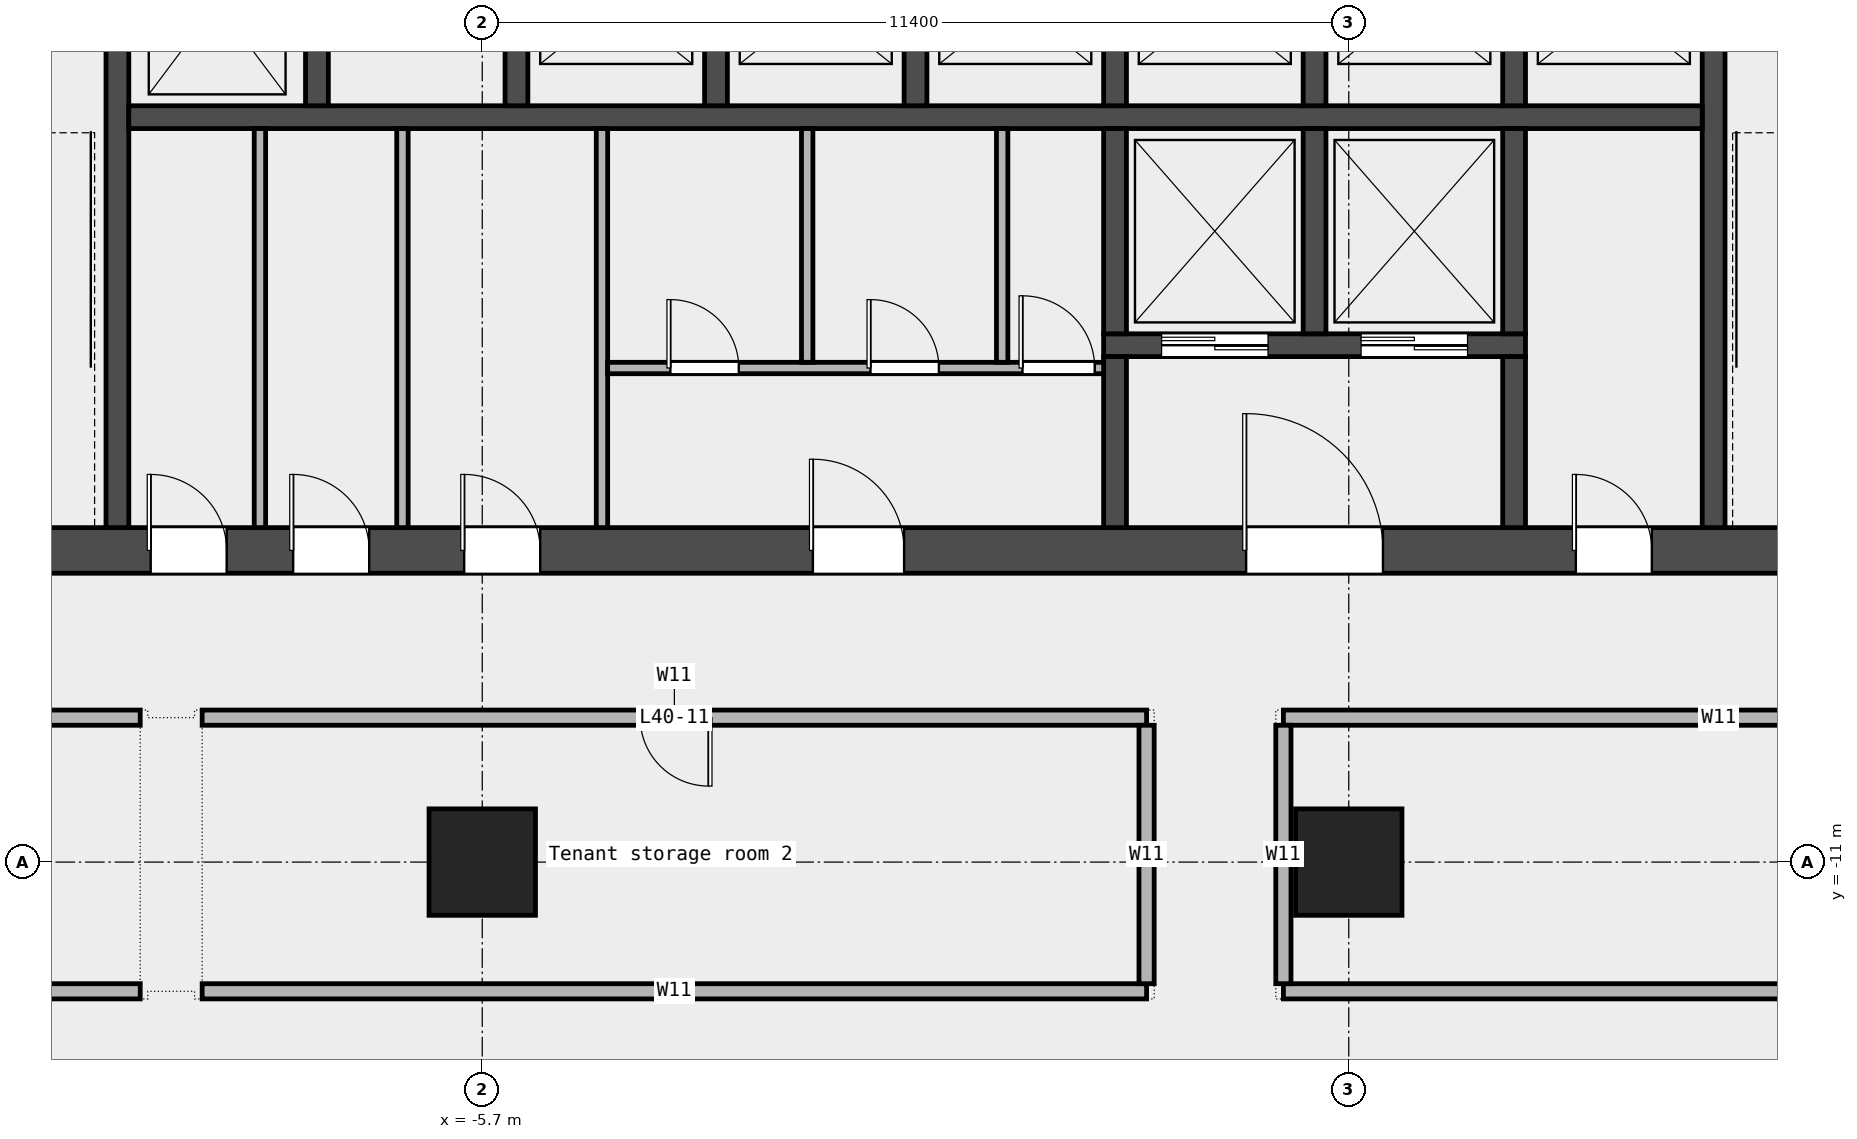
"""IFC4 building model, lengths in metres.
Left out: names, types, materials, properties, quantities, classifications, styles, units other than length and angle.
Written with IfcOpenShell. Run it as: python <this file> out.ifc"""

import sys

from ifc_helpers import new_model, si_unit, direction, frame, frame_2d, origin, origin_2d, place, context, subcontext, project, spatial, rectangle, extrude, element, fill, save


model = new_model("IFC4")
c1 = context("Model", 3, precision=1e-05, world=origin(), true_north=direction((0.0, 1.0)))
c2 = subcontext(c1, "Body", "Model", "MODEL_VIEW")
j1 = project(units=[si_unit("LENGTHUNIT", "METRE"), si_unit("PLANEANGLEUNIT", "RADIAN")], contexts=[c1])
p1 = place(None, origin())
s1 = spatial("IfcSite", under=j1, at=p1, CompositionType="ELEMENT")
p2 = place(p1, origin())
s2 = spatial("IfcBuilding", under=s1, at=p2, CompositionType="ELEMENT")
p3 = place(p2, frame((0.0, 0.0, 193.0)))
s3 = spatial("IfcBuildingStorey", under=s2, at=p3, CompositionType="ELEMENT", Elevation=193.0)
for number, where, z_axis, x_axis in (
    (1, (-5.7, -11.0, 0.0), (0.0, 0.0, 1.0), (1.0, 0.0, 0.0)),
    (2, (5.7, -11.0, 0.0), (0.0, 0.0, 1.0), (1.0, 0.0, 0.0)),
):
    element("IfcColumn", number, at=place(p3, frame(where, z_axis=z_axis, x_axis=x_axis)), inside=s3, PredefinedType="COLUMN", context=c2, shape_type="SweptSolid", body=[
        extrude(rectangle(XDim=1.4, YDim=1.4, at=origin_2d()), origin(), (0.0, 0.0, 1.0), 3.6),
    ])
p4 = place(p3, frame((-24.15, -12.7, 0.0), z_axis=(0.0, 0.0, 1.0), x_axis=(1.0, 0.0, 0.0)))
e3 = element("IfcWall", 3, at=p4, inside=s3, PredefinedType="PARTITIONING", context=c2, shape_type="SweptSolid", body=[
    extrude(rectangle(XDim=13.95, YDim=0.2, at=frame_2d((6.975, 0.0))), origin(), (0.0, 0.0, 1.0), 3.6),
])
p5 = place(p4, frame((7.825, 0.0, 0.0)))
e4 = element("IfcOpeningElement", 4, at=p5, cuts=e3, PredefinedType="OPENING", context=c2, shape_type="SweptSolid", body=[
    extrude(rectangle(XDim=1.5, YDim=2.1, at=frame_2d((0.75, 1.05))), frame((0.0, 0.112, 0.0), z_axis=(0.0, -1.0, 0.0), x_axis=(1.0, 0.0, 0.0)), (0.0, 0.0, 1.0), 0.224),
])
p6 = place(p3, frame((-9.385, -12.7, 0.0), z_axis=(0.0, 0.0, 1.0), x_axis=(1.0, 0.0, 0.0)))
e5 = element("IfcWall", 5, at=p6, inside=s3, PredefinedType="PARTITIONING", context=c2, shape_type="SweptSolid", body=[
    extrude(rectangle(XDim=12.425, YDim=0.2, at=frame_2d((6.212, 0.0))), origin(), (0.0, 0.0, 1.0), 3.6),
])
p7 = place(p3, frame((4.84, -12.7, 0.0), z_axis=(0.0, 0.0, 1.0), x_axis=(1.0, 0.0, 0.0)))
e6 = element("IfcWall", 6, at=p7, inside=s3, PredefinedType="PARTITIONING", context=c2, shape_type="SweptSolid", body=[
    extrude(rectangle(XDim=21.31, YDim=0.2, at=frame_2d((10.655, 0.0))), origin(), (0.0, 0.0, 1.0), 3.6),
])
p8 = place(p7, frame((9.955, 0.0, 0.0)))
e7 = element("IfcOpeningElement", 7, at=p8, cuts=e6, PredefinedType="OPENING", context=c2, shape_type="SweptSolid", body=[
    extrude(rectangle(XDim=1.2, YDim=2.1, at=frame_2d((0.6, 1.05))), frame((0.0, 0.112, 0.0), z_axis=(0.0, -1.0, 0.0), x_axis=(1.0, 0.0, 0.0)), (0.0, 0.0, 1.0), 0.224),
])
p9 = place(p3, frame((-16.3, -9.1, 0.0), z_axis=(0.0, 0.0, 1.0), x_axis=(1.0, 0.0, 0.0)))
e8 = element("IfcWall", 8, at=p9, inside=s3, PredefinedType="PARTITIONING", context=c2, shape_type="SweptSolid", body=[
    extrude(rectangle(XDim=6.1, YDim=0.2, at=frame_2d((3.05, 0.0))), origin(), (0.0, 0.0, 1.0), 3.6),
])
p10 = place(p3, frame((-9.385, -9.1, 0.0), z_axis=(0.0, 0.0, 1.0), x_axis=(1.0, 0.0, 0.0)))
e9 = element("IfcWall", 9, at=p10, inside=s3, PredefinedType="PARTITIONING", context=c2, shape_type="SweptSolid", body=[
    extrude(rectangle(XDim=12.425, YDim=0.2, at=frame_2d((6.212, 0.0))), origin(), (0.0, 0.0, 1.0), 3.6),
])
p11 = place(p10, frame((5.762, 0.0, 0.0)))
e10 = element("IfcOpeningElement", 10, at=p11, cuts=e9, PredefinedType="OPENING", context=c2, shape_type="SweptSolid", body=[
    extrude(rectangle(XDim=0.9, YDim=2.1, at=frame_2d((0.45, 1.05))), frame((0.0, 0.112, 0.0), z_axis=(0.0, -1.0, 0.0), x_axis=(1.0, 0.0, 0.0)), (0.0, 0.0, 1.0), 0.224),
])
p12 = place(p3, frame((4.84, -9.1, 0.0), z_axis=(0.0, 0.0, 1.0), x_axis=(1.0, 0.0, 0.0)))
e11 = element("IfcWall", 11, at=p12, inside=s3, PredefinedType="PARTITIONING", context=c2, shape_type="SweptSolid", body=[
    extrude(rectangle(XDim=11.46, YDim=0.2, at=frame_2d((5.73, 0.0))), origin(), (0.0, 0.0, 1.0), 3.6),
])
for number, where, z_axis, x_axis in (
    (12, (3.04, -12.6, 0.0), (0.0, 0.0, 1.0), (0.0, 1.0, 0.0)),
    (13, (4.84, -12.6, 0.0), (0.0, 0.0, 1.0), (0.0, 1.0, 0.0)),
):
    element("IfcWall", number, at=place(p3, frame(where, z_axis=z_axis, x_axis=x_axis)), inside=s3, PredefinedType="PARTITIONING", context=c2, shape_type="SweptSolid", body=[
        extrude(rectangle(XDim=3.4, YDim=0.2, at=frame_2d((1.7, 0.0))), origin(), (0.0, 0.0, 1.0), 3.6),
    ])
p13 = place(p3, frame((-14.4, -6.9, 0.0), z_axis=(0.0, 0.0, 1.0), x_axis=(1.0, 0.0, 0.0)))
e14 = element("IfcWall", 14, at=p13, inside=s3, PredefinedType="SHEAR", context=c2, shape_type="SweptSolid", body=[
    extrude(rectangle(XDim=28.8, YDim=0.6, at=frame_2d((14.4, 0.0))), origin(), (0.0, 0.0, 1.0), 3.7),
])
p14 = place(p13, frame((4.337, 0.0, 0.0)))
e15 = element("IfcOpeningElement", 15, at=p14, cuts=e14, PredefinedType="OPENING", context=c2, shape_type="SweptSolid", body=[
    extrude(rectangle(XDim=1.0, YDim=2.1, at=frame_2d((0.5, 1.05))), frame((0.0, 0.312, 0.0), z_axis=(0.0, -1.0, 0.0), x_axis=(1.0, 0.0, 0.0)), (0.0, 0.0, 1.0), 0.624),
])
p15 = place(p13, frame((6.212, 0.0, 0.0)))
e16 = element("IfcOpeningElement", 16, at=p15, cuts=e14, PredefinedType="OPENING", context=c2, shape_type="SweptSolid", body=[
    extrude(rectangle(XDim=1.0, YDim=2.1, at=frame_2d((0.5, 1.05))), frame((0.0, 0.312, 0.0), z_axis=(0.0, -1.0, 0.0), x_axis=(1.0, 0.0, 0.0)), (0.0, 0.0, 1.0), 0.624),
])
p16 = place(p13, frame((8.462, 0.0, 0.0)))
e17 = element("IfcOpeningElement", 17, at=p16, cuts=e14, PredefinedType="OPENING", context=c2, shape_type="SweptSolid", body=[
    extrude(rectangle(XDim=1.0, YDim=2.1, at=frame_2d((0.5, 1.05))), frame((0.0, 0.312, 0.0), z_axis=(0.0, -1.0, 0.0), x_axis=(1.0, 0.0, 0.0)), (0.0, 0.0, 1.0), 0.624),
])
p17 = place(p13, frame((13.05, 0.0, 0.0)))
e18 = element("IfcOpeningElement", 18, at=p17, cuts=e14, PredefinedType="OPENING", context=c2, shape_type="SweptSolid", body=[
    extrude(rectangle(XDim=1.2, YDim=2.1, at=frame_2d((0.6, 1.05))), frame((0.0, 0.312, 0.0), z_axis=(0.0, -1.0, 0.0), x_axis=(1.0, 0.0, 0.0)), (0.0, 0.0, 1.0), 0.624),
])
p18 = place(p13, frame((18.75, 0.0, 0.0)))
e19 = element("IfcOpeningElement", 19, at=p18, cuts=e14, PredefinedType="OPENING", context=c2, shape_type="SweptSolid", body=[
    extrude(rectangle(XDim=1.8, YDim=2.1, at=frame_2d((0.9, 1.05))), frame((0.0, 0.312, 0.0), z_axis=(0.0, -1.0, 0.0), x_axis=(1.0, 0.0, 0.0)), (0.0, 0.0, 1.0), 0.624),
])
p19 = place(p13, frame((23.087, 0.0, 0.0)))
e20 = element("IfcOpeningElement", 20, at=p19, cuts=e14, PredefinedType="OPENING", context=c2, shape_type="SweptSolid", body=[
    extrude(rectangle(XDim=1.0, YDim=2.1, at=frame_2d((0.5, 1.05))), frame((0.0, 0.312, 0.0), z_axis=(0.0, -1.0, 0.0), x_axis=(1.0, 0.0, 0.0)), (0.0, 0.0, 1.0), 0.624),
])
for number, where, z_axis, x_axis in (
    (21, (-10.5, -6.6, 0.0), (0.0, 0.0, 1.0), (0.0, 1.0, 0.0)),
    (22, (10.5, -6.6, 0.0), (0.0, 0.0, 1.0), (0.0, 1.0, 0.0)),
):
    element("IfcWall", number, at=place(p3, frame(where, z_axis=z_axis, x_axis=x_axis)), inside=s3, PredefinedType="SHEAR", context=c2, shape_type="SweptSolid", body=[
        extrude(rectangle(XDim=8.55, YDim=0.3, at=frame_2d((4.275, 0.0))), origin(), (0.0, 0.0, 1.0), 3.7),
    ])
p20 = place(p3, frame((-10.35, -1.2, 0.0), z_axis=(0.0, 0.0, 1.0), x_axis=(1.0, 0.0, 0.0)))
e23 = element("IfcWall", 23, at=p20, inside=s3, PredefinedType="SOLIDWALL", context=c2, shape_type="SweptSolid", body=[
    extrude(rectangle(XDim=20.7, YDim=0.3, at=frame_2d((10.35, 0.0))), origin(), (0.0, 0.0, 1.0), 3.7),
])
for number, where, z_axis, x_axis in (
    (24, (-7.875, -1.05, 0.0), (0.0, 0.0, 1.0), (0.0, 1.0, 0.0)),
    (25, (-5.25, -1.05, 0.0), (0.0, 0.0, 1.0), (0.0, 1.0, 0.0)),
    (26, (-2.625, -1.05, 0.0), (0.0, 0.0, 1.0), (0.0, 1.0, 0.0)),
    (27, (0.0, -1.05, 0.0), (0.0, 0.0, 1.0), (0.0, 1.0, 0.0)),
    (28, (2.625, -1.05, 0.0), (0.0, 0.0, 1.0), (0.0, 1.0, 0.0)),
    (29, (5.25, -1.05, 0.0), (0.0, 0.0, 1.0), (0.0, 1.0, 0.0)),
    (30, (7.875, -1.05, 0.0), (0.0, 0.0, 1.0), (0.0, 1.0, 0.0)),
):
    element("IfcWall", number, at=place(p3, frame(where, z_axis=z_axis, x_axis=x_axis)), inside=s3, PredefinedType="SOLIDWALL", context=c2, shape_type="SweptSolid", body=[
        extrude(rectangle(XDim=2.7, YDim=0.3, at=frame_2d((1.35, 0.0))), origin(), (0.0, 0.0, 1.0), 3.7),
    ])
p21 = place(p3, frame((2.475, -4.2, 0.0), z_axis=(0.0, 0.0, 1.0), x_axis=(1.0, 0.0, 0.0)))
e31 = element("IfcWall", 31, at=p21, inside=s3, PredefinedType="SOLIDWALL", context=c2, shape_type="SweptSolid", body=[
    extrude(rectangle(XDim=5.55, YDim=0.3, at=frame_2d((2.775, 0.0))), origin(), (0.0, 0.0, 1.0), 3.7),
])
p22 = place(p21, frame((0.762, 0.0, 0.0)))
e32 = element("IfcOpeningElement", 32, at=p22, cuts=e31, PredefinedType="OPENING", context=c2, shape_type="SweptSolid", body=[
    extrude(rectangle(XDim=1.4, YDim=2.1, at=frame_2d((0.7, 1.05))), frame((0.0, 0.162, 0.0), z_axis=(0.0, -1.0, 0.0), x_axis=(1.0, 0.0, 0.0)), (0.0, 0.0, 1.0), 0.324),
])
p23 = place(p21, frame((3.387, 0.0, 0.0)))
e33 = element("IfcOpeningElement", 33, at=p23, cuts=e31, PredefinedType="OPENING", context=c2, shape_type="SweptSolid", body=[
    extrude(rectangle(XDim=1.4, YDim=2.1, at=frame_2d((0.7, 1.05))), frame((0.0, 0.162, 0.0), z_axis=(0.0, -1.0, 0.0), x_axis=(1.0, 0.0, 0.0)), (0.0, 0.0, 1.0), 0.324),
])
p24 = place(p3, frame((2.625, -4.05, 0.0), z_axis=(0.0, 0.0, 1.0), x_axis=(0.0, 1.0, 0.0)))
e34 = element("IfcWall", 34, at=p24, inside=s3, PredefinedType="SOLIDWALL", context=c2, shape_type="SweptSolid", body=[
    extrude(rectangle(XDim=2.7, YDim=0.3, at=frame_2d((1.35, 0.0))), origin(), (0.0, 0.0, 1.0), 3.7),
])
p25 = place(p3, frame((2.625, -6.6, 0.0), z_axis=(0.0, 0.0, 1.0), x_axis=(0.0, 1.0, 0.0)))
e35 = element("IfcWall", 35, at=p25, inside=s3, PredefinedType="SOLIDWALL", context=c2, shape_type="SweptSolid", body=[
    extrude(rectangle(XDim=2.25, YDim=0.3, at=frame_2d((1.125, 0.0))), origin(), (0.0, 0.0, 1.0), 3.7),
])
for number, where, z_axis, x_axis in (
    (36, (5.25, -4.05, 0.0), (0.0, 0.0, 1.0), (0.0, 1.0, 0.0)),
    (37, (7.875, -4.05, 0.0), (0.0, 0.0, 1.0), (0.0, 1.0, 0.0)),
):
    element("IfcWall", number, at=place(p3, frame(where, z_axis=z_axis, x_axis=x_axis)), inside=s3, PredefinedType="SOLIDWALL", context=c2, shape_type="SweptSolid", body=[
        extrude(rectangle(XDim=2.7, YDim=0.3, at=frame_2d((1.35, 0.0))), origin(), (0.0, 0.0, 1.0), 3.7),
    ])
p26 = place(p3, frame((7.875, -6.6, 0.0), z_axis=(0.0, 0.0, 1.0), x_axis=(0.0, 1.0, 0.0)))
e38 = element("IfcWall", 38, at=p26, inside=s3, PredefinedType="SOLIDWALL", context=c2, shape_type="SweptSolid", body=[
    extrude(rectangle(XDim=2.25, YDim=0.3, at=frame_2d((1.125, 0.0))), origin(), (0.0, 0.0, 1.0), 3.7),
])
for number, where, z_axis, x_axis in (
    (39, (-8.625, -6.6, 0.0), (0.0, 0.0, 1.0), (0.0, 1.0, 0.0)),
    (40, (-6.75, -6.6, 0.0), (0.0, 0.0, 1.0), (0.0, 1.0, 0.0)),
    (41, (-4.125, -6.6, 0.0), (0.0, 0.0, 1.0), (0.0, 1.0, 0.0)),
):
    element("IfcWall", number, at=place(p3, frame(where, z_axis=z_axis, x_axis=x_axis)), inside=s3, PredefinedType="PARTITIONING", context=c2, shape_type="SweptSolid", body=[
        extrude(rectangle(XDim=5.25, YDim=0.15, at=frame_2d((2.625, 0.0))), origin(), (0.0, 0.0, 1.0), 3.7),
    ])
p27 = place(p3, frame((-4.05, -4.5, 0.0), z_axis=(0.0, 0.0, 1.0), x_axis=(1.0, 0.0, 0.0)))
e42 = element("IfcWall", 42, at=p27, inside=s3, PredefinedType="PARTITIONING", context=c2, shape_type="SweptSolid", body=[
    extrude(rectangle(XDim=6.525, YDim=0.15, at=frame_2d((3.263, 0.0))), origin(), (0.0, 0.0, 1.0), 3.7),
])
p28 = place(p27, frame((0.825, 0.0, 0.0)))
e43 = element("IfcOpeningElement", 43, at=p28, cuts=e42, PredefinedType="OPENING", context=c2, shape_type="SweptSolid", body=[
    extrude(rectangle(XDim=0.9, YDim=2.1, at=frame_2d((0.45, 1.05))), frame((0.0, 0.087, 0.0), z_axis=(0.0, -1.0, 0.0), x_axis=(1.0, 0.0, 0.0)), (0.0, 0.0, 1.0), 0.174),
])
p29 = place(p27, frame((3.458, 0.0, 0.0)))
e44 = element("IfcOpeningElement", 44, at=p29, cuts=e42, PredefinedType="OPENING", context=c2, shape_type="SweptSolid", body=[
    extrude(rectangle(XDim=0.9, YDim=2.1, at=frame_2d((0.45, 1.05))), frame((0.0, 0.087, 0.0), z_axis=(0.0, -1.0, 0.0), x_axis=(1.0, 0.0, 0.0)), (0.0, 0.0, 1.0), 0.174),
])
p30 = place(p27, frame((5.458, 0.0, 0.0)))
e45 = element("IfcOpeningElement", 45, at=p30, cuts=e42, PredefinedType="OPENING", context=c2, shape_type="SweptSolid", body=[
    extrude(rectangle(XDim=0.95, YDim=2.1, at=frame_2d((0.475, 1.05))), frame((0.0, 0.087, 0.0), z_axis=(0.0, -1.0, 0.0), x_axis=(1.0, 0.0, 0.0)), (0.0, 0.0, 1.0), 0.174),
])
for number, where, z_axis, x_axis in (
    (46, (-1.425, -4.425, 0.0), (0.0, 0.0, 1.0), (0.0, 1.0, 0.0)),
    (47, (1.14, -4.425, 0.0), (0.0, 0.0, 1.0), (0.0, 1.0, 0.0)),
):
    element("IfcWall", number, at=place(p3, frame(where, z_axis=z_axis, x_axis=x_axis)), inside=s3, PredefinedType="PARTITIONING", context=c2, shape_type="SweptSolid", body=[
        extrude(rectangle(XDim=3.075, YDim=0.15, at=frame_2d((1.538, 0.0))), origin(), (0.0, 0.0, 1.0), 3.7),
    ])
p31 = place(p11, origin())
e48 = element("IfcDoor", 48, at=p31, inside=s3, OperationType="SINGLE_SWING_LEFT", PredefinedType="DOOR", context=c2, shape_type="SweptSolid", body=[
    extrude(rectangle(XDim=0.9, YDim=2.1, at=frame_2d((0.45, 1.05))), frame((0.0, 0.025, 0.0), z_axis=(0.0, -1.0, 0.0), x_axis=(1.0, 0.0, 0.0)), (0.0, 0.0, 1.0), 0.05),
])
fill(e10, e48)
p32 = place(p22, origin())
e49 = element("IfcDoor", 49, at=p32, inside=s3, OperationType="DOUBLE_DOOR_SLIDING", PredefinedType="DOOR", context=c2, shape_type="SweptSolid", body=[
    extrude(rectangle(XDim=1.4, YDim=2.1, at=frame_2d((0.7, 1.05))), frame((0.0, 0.025, 0.0), z_axis=(0.0, -1.0, 0.0), x_axis=(1.0, 0.0, 0.0)), (0.0, 0.0, 1.0), 0.05),
])
fill(e32, e49)
p33 = place(p23, origin())
e50 = element("IfcDoor", 50, at=p33, inside=s3, OperationType="DOUBLE_DOOR_SLIDING", PredefinedType="DOOR", context=c2, shape_type="SweptSolid", body=[
    extrude(rectangle(XDim=1.4, YDim=2.1, at=frame_2d((0.7, 1.05))), frame((0.0, 0.025, 0.0), z_axis=(0.0, -1.0, 0.0), x_axis=(1.0, 0.0, 0.0)), (0.0, 0.0, 1.0), 0.05),
])
fill(e33, e50)
p34 = place(p14, origin())
e51 = element("IfcDoor", 51, at=p34, inside=s3, OperationType="SINGLE_SWING_LEFT", PredefinedType="DOOR", context=c2, shape_type="SweptSolid", body=[
    extrude(rectangle(XDim=1.0, YDim=2.1, at=frame_2d((0.5, 1.05))), frame((0.0, 0.025, 0.0), z_axis=(0.0, -1.0, 0.0), x_axis=(1.0, 0.0, 0.0)), (0.0, 0.0, 1.0), 0.05),
])
fill(e15, e51)
p35 = place(p15, origin())
e52 = element("IfcDoor", 52, at=p35, inside=s3, OperationType="SINGLE_SWING_LEFT", PredefinedType="DOOR", context=c2, shape_type="SweptSolid", body=[
    extrude(rectangle(XDim=1.0, YDim=2.1, at=frame_2d((0.5, 1.05))), frame((0.0, 0.025, 0.0), z_axis=(0.0, -1.0, 0.0), x_axis=(1.0, 0.0, 0.0)), (0.0, 0.0, 1.0), 0.05),
])
fill(e16, e52)
p36 = place(p16, origin())
e53 = element("IfcDoor", 53, at=p36, inside=s3, OperationType="SINGLE_SWING_LEFT", PredefinedType="DOOR", context=c2, shape_type="SweptSolid", body=[
    extrude(rectangle(XDim=1.0, YDim=2.1, at=frame_2d((0.5, 1.05))), frame((0.0, 0.025, 0.0), z_axis=(0.0, -1.0, 0.0), x_axis=(1.0, 0.0, 0.0)), (0.0, 0.0, 1.0), 0.05),
])
fill(e17, e53)
p37 = place(p17, origin())
e54 = element("IfcDoor", 54, at=p37, inside=s3, OperationType="SINGLE_SWING_LEFT", PredefinedType="DOOR", context=c2, shape_type="SweptSolid", body=[
    extrude(rectangle(XDim=1.2, YDim=2.1, at=frame_2d((0.6, 1.05))), frame((0.0, 0.025, 0.0), z_axis=(0.0, -1.0, 0.0), x_axis=(1.0, 0.0, 0.0)), (0.0, 0.0, 1.0), 0.05),
])
fill(e18, e54)
p38 = place(p28, origin())
e55 = element("IfcDoor", 55, at=p38, inside=s3, OperationType="SINGLE_SWING_LEFT", PredefinedType="DOOR", context=c2, shape_type="SweptSolid", body=[
    extrude(rectangle(XDim=0.9, YDim=2.1, at=frame_2d((0.45, 1.05))), frame((0.0, 0.025, 0.0), z_axis=(0.0, -1.0, 0.0), x_axis=(1.0, 0.0, 0.0)), (0.0, 0.0, 1.0), 0.05),
])
fill(e43, e55)
p39 = place(p29, origin())
e56 = element("IfcDoor", 56, at=p39, inside=s3, OperationType="SINGLE_SWING_LEFT", PredefinedType="DOOR", context=c2, shape_type="SweptSolid", body=[
    extrude(rectangle(XDim=0.9, YDim=2.1, at=frame_2d((0.45, 1.05))), frame((0.0, 0.025, 0.0), z_axis=(0.0, -1.0, 0.0), x_axis=(1.0, 0.0, 0.0)), (0.0, 0.0, 1.0), 0.05),
])
fill(e44, e56)
p40 = place(p30, origin())
e57 = element("IfcDoor", 57, at=p40, inside=s3, OperationType="SINGLE_SWING_LEFT", PredefinedType="DOOR", context=c2, shape_type="SweptSolid", body=[
    extrude(rectangle(XDim=0.95, YDim=2.1, at=frame_2d((0.475, 1.05))), frame((0.0, 0.025, 0.0), z_axis=(0.0, -1.0, 0.0), x_axis=(1.0, 0.0, 0.0)), (0.0, 0.0, 1.0), 0.05),
])
fill(e45, e57)
p41 = place(p18, origin())
e58 = element("IfcDoor", 58, at=p41, inside=s3, OperationType="DOUBLE_DOOR_SINGLE_SWING", PredefinedType="DOOR", context=c2, shape_type="SweptSolid", body=[
    extrude(rectangle(XDim=1.8, YDim=2.1, at=frame_2d((0.9, 1.05))), frame((0.0, 0.025, 0.0), z_axis=(0.0, -1.0, 0.0), x_axis=(1.0, 0.0, 0.0)), (0.0, 0.0, 1.0), 0.05),
])
fill(e19, e58)
p42 = place(p19, origin())
e59 = element("IfcDoor", 59, at=p42, inside=s3, OperationType="SINGLE_SWING_LEFT", PredefinedType="DOOR", context=c2, shape_type="SweptSolid", body=[
    extrude(rectangle(XDim=1.0, YDim=2.1, at=frame_2d((0.5, 1.05))), frame((0.0, 0.025, 0.0), z_axis=(0.0, -1.0, 0.0), x_axis=(1.0, 0.0, 0.0)), (0.0, 0.0, 1.0), 0.05),
])
fill(e20, e59)
save(model, sys.argv[1])
